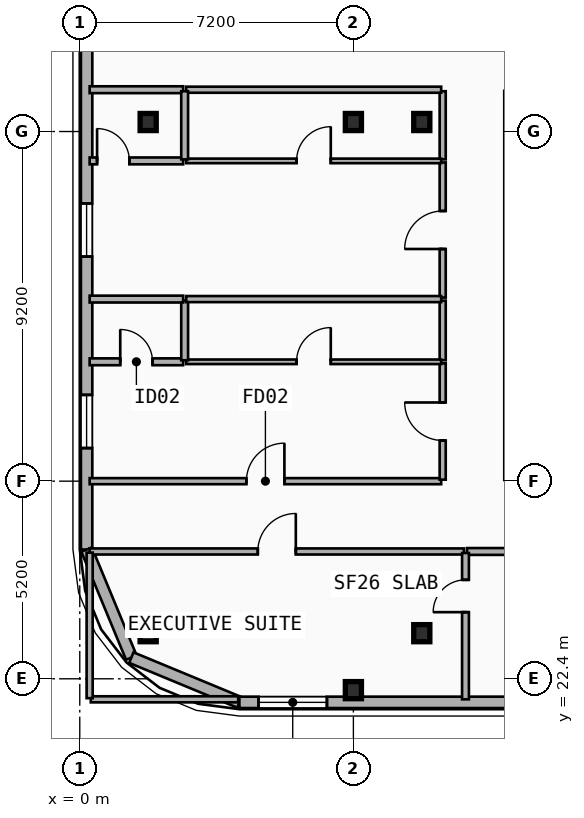
"""IFC4 building model, lengths in metres.
Left out: names, types, materials, properties, quantities, classifications, styles, units other than length and angle.
Written with IfcOpenShell. Run it as: python <this file> out.ifc"""

import sys

from ifc_helpers import new_model, si_unit, direction, frame, frame_2d, origin, origin_2d, place, context, subcontext, project, spatial, rectangle, i_section, extrude, element, fill, save


model = new_model("IFC4")
c1 = context("Model", 3, precision=1e-05, world=origin(), true_north=direction((0.0, 1.0)))
c2 = subcontext(c1, "Body", "Model", "MODEL_VIEW")
j1 = project(units=[si_unit("LENGTHUNIT", "METRE"), si_unit("PLANEANGLEUNIT", "RADIAN")], contexts=[c1])
p1 = place(None, origin())
s1 = spatial("IfcSite", under=j1, at=p1, CompositionType="ELEMENT")
p2 = place(p1, origin())
s2 = spatial("IfcBuilding", under=s1, at=p2, CompositionType="ELEMENT")
p3 = place(p2, frame((0.0, 0.0, 46.5)))
s3 = spatial("IfcBuildingStorey", under=s2, at=p3, CompositionType="ELEMENT", Elevation=46.5)
for number, where, z_axis, x_axis in (
    (1, (9.0, 23.6, 0.0), (0.0, 0.0, 1.0), (1.0, 0.0, 0.0)),
    (2, (9.0, 37.05, 0.0), (0.0, 0.0, 1.0), (1.0, 0.0, 0.0)),
    (3, (1.8, 23.6, 0.0), (0.0, 0.0, 1.0), (1.0, 0.0, 0.0)),
    (4, (1.8, 37.05, 0.0), (0.0, 0.0, 1.0), (1.0, 0.0, 0.0)),
):
    element("IfcColumn", number, at=place(p3, frame(where, z_axis=z_axis, x_axis=x_axis)), inside=s3, PredefinedType="COLUMN", context=c2, shape_type="SweptSolid", body=[
        extrude(i_section(OverallWidth=0.424, OverallDepth=0.45, WebThickness=0.041, FlangeThickness=0.065, FilletRadius=0.015, at=origin_2d()), origin(), (0.0, 0.0, 1.0), 3.5),
    ])
p4 = place(p3, frame((7.2, 22.198, 0.0), z_axis=(0.0, -0.079891690793, 0.996803550226), x_axis=(1.0, 0.0, 0.0)))
e5 = element("IfcColumn", 5, at=p4, inside=s3, PredefinedType="COLUMN", context=c2, shape_type="SweptSolid", body=[
    extrude(i_section(OverallWidth=0.424, OverallDepth=0.45, WebThickness=0.041, FlangeThickness=0.065, FilletRadius=0.015, at=origin_2d()), origin(), (0.0, 0.0, 1.0), 3.511),
])
p5 = place(p3, frame((7.2, 37.05, 0.0), z_axis=(0.0, 0.0, 1.0), x_axis=(1.0, 0.0, 0.0)))
e6 = element("IfcColumn", 6, at=p5, inside=s3, PredefinedType="COLUMN", context=c2, shape_type="SweptSolid", body=[
    extrude(i_section(OverallWidth=0.424, OverallDepth=0.45, WebThickness=0.041, FlangeThickness=0.065, FilletRadius=0.015, at=origin_2d()), origin(), (0.0, 0.0, 1.0), 3.5),
])
p6 = place(p3, frame((0.18, 25.8, 0.0), z_axis=(0.0, 0.0, 1.0), x_axis=(0.0, 1.0, 0.0)))
e7 = element("IfcWall", 7, at=p6, inside=s3, PredefinedType="SOLIDWALL", context=c2, shape_type="SweptSolid", body=[
    extrude(rectangle(XDim=15.2, YDim=0.3, at=frame_2d((7.6, 0.0))), origin(), (0.0, 0.0, 1.0), 3.24),
])
p7 = place(p6, frame((2.67, 0.0, 0.48)))
e8 = element("IfcOpeningElement", 8, at=p7, cuts=e7, PredefinedType="OPENING", context=c2, shape_type="SweptSolid", body=[
    extrude(rectangle(XDim=1.4, YDim=1.8, at=frame_2d((0.7, 0.9))), frame((0.0, 0.16, 0.0), z_axis=(0.0, -1.0, 0.0), x_axis=(1.0, 0.0, 0.0)), (0.0, 0.0, 1.0), 0.32),
])
p8 = place(p6, frame((7.709, 0.0, 0.48)))
e9 = element("IfcOpeningElement", 9, at=p8, cuts=e7, PredefinedType="OPENING", context=c2, shape_type="SweptSolid", body=[
    extrude(rectangle(XDim=1.4, YDim=1.8, at=frame_2d((0.7, 0.9))), frame((0.0, 0.16, 0.0), z_axis=(0.0, -1.0, 0.0), x_axis=(1.0, 0.0, 0.0)), (0.0, 0.0, 1.0), 0.32),
])
for number, where, z_axis, x_axis in (
    (10, (1.357, 22.958, 0.0), (0.0, 0.0, 1.0), (-0.383, 0.924, 0.0)),
    (11, (4.2, 21.78, 0.0), (0.0, 0.0, 1.0), (-0.924, 0.383, 0.0)),
):
    element("IfcWall", number, at=place(p3, frame(where, z_axis=z_axis, x_axis=x_axis)), inside=s3, PredefinedType="SOLIDWALL", context=c2, shape_type="SweptSolid", body=[
        extrude(rectangle(XDim=3.077, YDim=0.3, at=frame_2d((1.538, 0.0))), origin(), (0.0, 0.0, 1.0), 3.24),
    ])
p9 = place(p3, frame((53.4, 21.78, 0.0), z_axis=(0.0, 0.0, 1.0), x_axis=(-1.0, 0.0, 0.0)))
e12 = element("IfcWall", 12, at=p9, inside=s3, PredefinedType="SOLIDWALL", context=c2, shape_type="SweptSolid", body=[
    extrude(rectangle(XDim=49.2, YDim=0.3, at=frame_2d((24.6, 0.0))), origin(), (0.0, 0.0, 1.0), 2.82),
])
p10 = place(p9, frame((46.896, 0.0, 0.65)))
e13 = element("IfcOpeningElement", 13, at=p10, cuts=e12, PredefinedType="OPENING", context=c2, shape_type="SweptSolid", body=[
    extrude(rectangle(XDim=1.8, YDim=1.8, at=frame_2d((0.9, 0.9))), frame((0.0, 0.16, 0.0), z_axis=(0.0, -1.0, 0.0), x_axis=(1.0, 0.0, 0.0)), (0.0, 0.0, 1.0), 0.32),
])
p11 = place(p9, frame((33.295, 0.0, 0.48)))
e14 = element("IfcOpeningElement", 14, at=p11, cuts=e12, PredefinedType="OPENING", context=c2, shape_type="SweptSolid", body=[
    extrude(rectangle(XDim=1.2, YDim=1.5, at=frame_2d((0.6, 0.75))), frame((0.0, 0.16, 0.0), z_axis=(0.0, -1.0, 0.0), x_axis=(1.0, 0.0, 0.0)), (0.0, 0.0, 1.0), 0.32),
])
p12 = place(p9, frame((9.195, 0.0, 0.34)))
e15 = element("IfcOpeningElement", 15, at=p12, cuts=e12, PredefinedType="OPENING", context=c2, shape_type="SweptSolid", body=[
    extrude(rectangle(XDim=1.2, YDim=1.5, at=frame_2d((0.6, 0.75))), frame((0.0, 0.16, 0.0), z_axis=(0.0, -1.0, 0.0), x_axis=(1.0, 0.0, 0.0)), (0.0, 0.0, 1.0), 0.32),
])
p13 = place(p9, frame((4.259, 0.0, 0.65)))
e16 = element("IfcOpeningElement", 16, at=p13, cuts=e12, PredefinedType="OPENING", context=c2, shape_type="SweptSolid", body=[
    extrude(rectangle(XDim=1.8, YDim=1.8, at=frame_2d((0.9, 0.9))), frame((0.0, 0.16, 0.0), z_axis=(0.0, -1.0, 0.0), x_axis=(1.0, 0.0, 0.0)), (0.0, 0.0, 1.0), 0.32),
])
p14 = place(p3, frame((0.26, 27.6, 0.0), z_axis=(0.0, 0.0, 1.0), x_axis=(1.0, 0.0, 0.0)))
e17 = element("IfcWall", 17, at=p14, inside=s3, PredefinedType="PARTITIONING", context=c2, shape_type="SweptSolid", body=[
    extrude(rectangle(XDim=9.25, YDim=0.16, at=frame_2d((4.625, 0.0))), origin(), (0.0, 0.0, 1.0), 2.57),
])
p15 = place(p14, frame((4.125, 0.0, 0.0)))
e18 = element("IfcOpeningElement", 18, at=p15, cuts=e17, PredefinedType="OPENING", context=c2, shape_type="SweptSolid", body=[
    extrude(rectangle(XDim=1.0, YDim=2.15, at=frame_2d((0.5, 1.075))), frame((0.0, 0.09, 0.0), z_axis=(0.0, -1.0, 0.0), x_axis=(1.0, 0.0, 0.0)), (0.0, 0.0, 1.0), 0.18),
])
p16 = place(p3, frame((0.26, 25.75, 0.0), z_axis=(0.0, 0.0, 1.0), x_axis=(1.0, 0.0, 0.0)))
e19 = element("IfcWall", 19, at=p16, inside=s3, PredefinedType="PARTITIONING", context=c2, shape_type="SweptSolid", body=[
    extrude(rectangle(XDim=9.85, YDim=0.16, at=frame_2d((4.925, 0.0))), origin(), (0.0, 0.0, 1.0), 2.57),
])
p17 = place(p16, frame((4.425, 0.0, 0.0)))
e20 = element("IfcOpeningElement", 20, at=p17, cuts=e19, PredefinedType="OPENING", context=c2, shape_type="SweptSolid", body=[
    extrude(rectangle(XDim=1.0, YDim=2.15, at=frame_2d((0.5, 1.075))), frame((0.0, 0.09, 0.0), z_axis=(0.0, -1.0, 0.0), x_axis=(1.0, 0.0, 0.0)), (0.0, 0.0, 1.0), 0.18),
])
p18 = place(p3, frame((10.19, 25.75, 0.0), z_axis=(0.0, 0.0, 1.0), x_axis=(1.0, 0.0, 0.0)))
e21 = element("IfcWall", 21, at=p18, inside=s3, PredefinedType="PLUMBINGWALL", context=c2, shape_type="SweptSolid", body=[
    extrude(rectangle(XDim=1.97, YDim=0.18, at=frame_2d((0.985, 0.0))), origin(), (0.0, 0.0, 1.0), 2.28),
])
p19 = place(p3, frame((9.55, 27.64, 0.0), z_axis=(0.0, 0.0, 1.0), x_axis=(0.0, 1.0, 0.0)))
e22 = element("IfcWall", 22, at=p19, inside=s3, PredefinedType="PARTITIONING", context=c2, shape_type="SweptSolid", body=[
    extrude(rectangle(XDim=3.061, YDim=0.16, at=frame_2d((1.531, 0.0))), origin(), (0.0, 0.0, 1.0), 3.24),
])
p20 = place(p19, frame((1.031, 0.0, 0.0)))
e23 = element("IfcOpeningElement", 23, at=p20, cuts=e22, PredefinedType="OPENING", context=c2, shape_type="SweptSolid", body=[
    extrude(rectangle(XDim=1.0, YDim=2.15, at=frame_2d((0.5, 1.075))), frame((0.0, 0.09, 0.0), z_axis=(0.0, -1.0, 0.0), x_axis=(1.0, 0.0, 0.0)), (0.0, 0.0, 1.0), 0.18),
])
p21 = place(p3, frame((9.55, 30.781, 0.0), z_axis=(0.0, 0.0, 1.0), x_axis=(0.0, 1.0, 0.0)))
e24 = element("IfcWall", 24, at=p21, inside=s3, PredefinedType="PARTITIONING", context=c2, shape_type="SweptSolid", body=[
    extrude(rectangle(XDim=1.57, YDim=0.16, at=frame_2d((0.785, 0.0))), origin(), (0.0, 0.0, 1.0), 3.24),
])
p22 = place(p3, frame((9.55, 32.431, 0.0), z_axis=(0.0, 0.0, 1.0), x_axis=(0.0, 1.0, 0.0)))
e25 = element("IfcWall", 25, at=p22, inside=s3, PredefinedType="PARTITIONING", context=c2, shape_type="SweptSolid", body=[
    extrude(rectangle(XDim=3.556, YDim=0.16, at=frame_2d((1.778, 0.0))), origin(), (0.0, 0.0, 1.0), 3.24),
])
p23 = place(p22, frame((1.278, 0.0, 0.0)))
e26 = element("IfcOpeningElement", 26, at=p23, cuts=e25, PredefinedType="OPENING", context=c2, shape_type="SweptSolid", body=[
    extrude(rectangle(XDim=1.0, YDim=2.15, at=frame_2d((0.5, 1.075))), frame((0.0, 0.09, 0.0), z_axis=(0.0, -1.0, 0.0), x_axis=(1.0, 0.0, 0.0)), (0.0, 0.0, 1.0), 0.18),
])
p24 = place(p3, frame((9.55, 36.067, 0.0), z_axis=(0.0, 0.0, 1.0), x_axis=(0.0, 1.0, 0.0)))
e27 = element("IfcWall", 27, at=p24, inside=s3, PredefinedType="PARTITIONING", context=c2, shape_type="SweptSolid", body=[
    extrude(rectangle(XDim=1.793, YDim=0.16, at=frame_2d((0.896, 0.0))), origin(), (0.0, 0.0, 1.0), 2.72),
])
p25 = place(p3, frame((0.26, 37.9, 0.0), z_axis=(0.0, 0.0, 1.0), x_axis=(1.0, 0.0, 0.0)))
e28 = element("IfcWall", 28, at=p25, inside=s3, PredefinedType="PLUMBINGWALL", context=c2, shape_type="SweptSolid", body=[
    extrude(rectangle(XDim=2.46, YDim=0.18, at=frame_2d((1.23, 0.0))), origin(), (0.0, 0.0, 1.0), 3.24),
])
p26 = place(p3, frame((2.8, 37.9, 0.0), z_axis=(0.0, 0.0, 1.0), x_axis=(1.0, 0.0, 0.0)))
e29 = element("IfcWall", 29, at=p26, inside=s3, PredefinedType="PARTITIONING", context=c2, shape_type="SweptSolid", body=[
    extrude(rectangle(XDim=6.71, YDim=0.16, at=frame_2d((3.355, 0.0))), origin(), (0.0, 0.0, 1.0), 3.24),
])
p27 = place(p3, frame((0.26, 30.741, 0.0), z_axis=(0.0, 0.0, 1.0), x_axis=(1.0, 0.0, 0.0)))
e30 = element("IfcWall", 30, at=p27, inside=s3, PredefinedType="PLUMBINGWALL", context=c2, shape_type="SweptSolid", body=[
    extrude(rectangle(XDim=2.46, YDim=0.18, at=frame_2d((1.23, 0.0))), origin(), (0.0, 0.0, 1.0), 2.57),
])
p28 = place(p27, frame((0.805, 0.0, 0.0)))
e31 = element("IfcOpeningElement", 31, at=p28, cuts=e30, PredefinedType="OPENING", context=c2, shape_type="SweptSolid", body=[
    extrude(rectangle(XDim=0.85, YDim=2.1, at=frame_2d((0.425, 1.05))), frame((0.0, 0.1, 0.0), z_axis=(0.0, -1.0, 0.0), x_axis=(1.0, 0.0, 0.0)), (0.0, 0.0, 1.0), 0.2),
])
p29 = place(p3, frame((2.8, 30.741, 0.0), z_axis=(0.0, 0.0, 1.0), x_axis=(1.0, 0.0, 0.0)))
e32 = element("IfcWall", 32, at=p29, inside=s3, PredefinedType="PARTITIONING", context=c2, shape_type="SweptSolid", body=[
    extrude(rectangle(XDim=6.71, YDim=0.12, at=frame_2d((3.355, 0.0))), origin(), (0.0, 0.0, 1.0), 2.57),
])
p30 = place(p29, frame((2.905, 0.0, 0.0)))
e33 = element("IfcOpeningElement", 33, at=p30, cuts=e32, PredefinedType="OPENING", context=c2, shape_type="SweptSolid", body=[
    extrude(rectangle(XDim=0.9, YDim=2.1, at=frame_2d((0.45, 1.05))), frame((0.0, 0.07, 0.0), z_axis=(0.0, -1.0, 0.0), x_axis=(1.0, 0.0, 0.0)), (0.0, 0.0, 1.0), 0.14),
])
p31 = place(p3, frame((2.76, 30.781, 0.0), z_axis=(0.0, 0.0, 1.0), x_axis=(0.0, 1.0, 0.0)))
e34 = element("IfcWall", 34, at=p31, inside=s3, PredefinedType="PLUMBINGWALL", context=c2, shape_type="SweptSolid", body=[
    extrude(rectangle(XDim=1.57, YDim=0.18, at=frame_2d((0.785, 0.0))), origin(), (0.0, 0.0, 1.0), 3.24),
])
p32 = place(p3, frame((0.26, 32.391, 0.0), z_axis=(0.0, 0.0, 1.0), x_axis=(1.0, 0.0, 0.0)))
e35 = element("IfcWall", 35, at=p32, inside=s3, PredefinedType="PLUMBINGWALL", context=c2, shape_type="SweptSolid", body=[
    extrude(rectangle(XDim=2.46, YDim=0.18, at=frame_2d((1.23, 0.0))), origin(), (0.0, 0.0, 1.0), 2.57),
])
p33 = place(p3, frame((2.8, 32.391, 0.0), z_axis=(0.0, 0.0, 1.0), x_axis=(1.0, 0.0, 0.0)))
e36 = element("IfcWall", 36, at=p33, inside=s3, PredefinedType="PARTITIONING", context=c2, shape_type="SweptSolid", body=[
    extrude(rectangle(XDim=6.71, YDim=0.16, at=frame_2d((3.355, 0.0))), origin(), (0.0, 0.0, 1.0), 2.57),
])
p34 = place(p3, frame((0.26, 36.027, 0.0), z_axis=(0.0, 0.0, 1.0), x_axis=(1.0, 0.0, 0.0)))
e37 = element("IfcWall", 37, at=p34, inside=s3, PredefinedType="PLUMBINGWALL", context=c2, shape_type="SweptSolid", body=[
    extrude(rectangle(XDim=2.46, YDim=0.18, at=frame_2d((1.23, 0.0))), origin(), (0.0, 0.0, 1.0), 2.57),
])
p35 = place(p34, frame((0.195, 0.0, 0.0)))
e38 = element("IfcOpeningElement", 38, at=p35, cuts=e37, PredefinedType="OPENING", context=c2, shape_type="SweptSolid", body=[
    extrude(rectangle(XDim=0.85, YDim=2.1, at=frame_2d((0.425, 1.05))), frame((0.0, 0.1, 0.0), z_axis=(0.0, -1.0, 0.0), x_axis=(1.0, 0.0, 0.0)), (0.0, 0.0, 1.0), 0.2),
])
p36 = place(p3, frame((2.8, 36.027, 0.0), z_axis=(0.0, 0.0, 1.0), x_axis=(1.0, 0.0, 0.0)))
e39 = element("IfcWall", 39, at=p36, inside=s3, PredefinedType="PARTITIONING", context=c2, shape_type="SweptSolid", body=[
    extrude(rectangle(XDim=6.71, YDim=0.12, at=frame_2d((3.355, 0.0))), origin(), (0.0, 0.0, 1.0), 2.57),
])
p37 = place(p36, frame((2.905, 0.0, 0.0)))
e40 = element("IfcOpeningElement", 40, at=p37, cuts=e39, PredefinedType="OPENING", context=c2, shape_type="SweptSolid", body=[
    extrude(rectangle(XDim=0.9, YDim=2.1, at=frame_2d((0.45, 1.05))), frame((0.0, 0.07, 0.0), z_axis=(0.0, -1.0, 0.0), x_axis=(1.0, 0.0, 0.0)), (0.0, 0.0, 1.0), 0.14),
])
p38 = place(p3, frame((2.76, 36.067, 0.0), z_axis=(0.0, 0.0, 1.0), x_axis=(0.0, 1.0, 0.0)))
e41 = element("IfcWall", 41, at=p38, inside=s3, PredefinedType="PLUMBINGWALL", context=c2, shape_type="SweptSolid", body=[
    extrude(rectangle(XDim=1.793, YDim=0.18, at=frame_2d((0.896, 0.0))), origin(), (0.0, 0.0, 1.0), 2.72),
])
p39 = place(p3, frame((10.15, 21.86, 0.0), z_axis=(0.0, 0.0, 1.0), x_axis=(0.0, 1.0, 0.0)))
e42 = element("IfcWall", 42, at=p39, inside=s3, PredefinedType="PLUMBINGWALL", context=c2, shape_type="SweptSolid", body=[
    extrude(rectangle(XDim=3.85, YDim=0.18, at=frame_2d((1.925, 0.0))), origin(), (0.0, 0.0, 1.0), 2.72),
])
p40 = place(p39, frame((2.293, 0.0, 0.0)))
e43 = element("IfcOpeningElement", 43, at=p40, cuts=e42, PredefinedType="OPENING", context=c2, shape_type="SweptSolid", body=[
    extrude(rectangle(XDim=0.85, YDim=2.1, at=frame_2d((0.425, 1.05))), frame((0.0, 0.1, 0.0), z_axis=(0.0, -1.0, 0.0), x_axis=(1.0, 0.0, 0.0)), (0.0, 0.0, 1.0), 0.2),
])
p41 = place(p3, frame((0.29, 21.86, 0.0), z_axis=(0.0, 0.0, 1.0), x_axis=(1.0, 0.0, 0.0)))
e44 = element("IfcWall", 44, at=p41, inside=s3, PredefinedType="PARTITIONING", context=c2, shape_type="SweptSolid", body=[
    extrude(rectangle(XDim=3.88, YDim=0.16, at=frame_2d((1.94, 0.0))), origin(), (0.0, 0.0, 1.0), 2.72),
])
p42 = place(p3, frame((0.26, 21.89, 0.0), z_axis=(0.0, 0.0, 1.0), x_axis=(0.0, 1.0, 0.0)))
e45 = element("IfcWall", 45, at=p42, inside=s3, PredefinedType="PARTITIONING", context=c2, shape_type="SweptSolid", body=[
    extrude(rectangle(XDim=3.83, YDim=0.16, at=frame_2d((1.915, 0.0))), origin(), (0.0, 0.0, 1.0), 3.24),
])
p43 = place(p7, origin())
e46 = element("IfcWindow", 46, at=p43, inside=s3, PartitioningType="SINGLE_PANEL", PredefinedType="WINDOW", context=c2, shape_type="SweptSolid", body=[
    extrude(rectangle(XDim=1.4, YDim=1.8, at=frame_2d((0.7, 0.9))), frame((0.0, 0.03, 0.0), z_axis=(0.0, -1.0, 0.0), x_axis=(1.0, 0.0, 0.0)), (0.0, 0.0, 1.0), 0.06),
])
fill(e8, e46)
p44 = place(p8, origin())
e47 = element("IfcWindow", 47, at=p44, inside=s3, PartitioningType="SINGLE_PANEL", PredefinedType="WINDOW", context=c2, shape_type="SweptSolid", body=[
    extrude(rectangle(XDim=1.4, YDim=1.8, at=frame_2d((0.7, 0.9))), frame((0.0, 0.03, 0.0), z_axis=(0.0, -1.0, 0.0), x_axis=(1.0, 0.0, 0.0)), (0.0, 0.0, 1.0), 0.06),
])
fill(e9, e47)
p45 = place(p10, origin())
e48 = element("IfcWindow", 48, at=p45, inside=s3, PartitioningType="SINGLE_PANEL", PredefinedType="WINDOW", context=c2, shape_type="SweptSolid", body=[
    extrude(rectangle(XDim=1.8, YDim=1.8, at=frame_2d((0.9, 0.9))), frame((0.0, 0.03, 0.0), z_axis=(0.0, -1.0, 0.0), x_axis=(1.0, 0.0, 0.0)), (0.0, 0.0, 1.0), 0.06),
])
fill(e13, e48)
p46 = place(p15, origin())
e49 = element("IfcDoor", 49, at=p46, inside=s3, OperationType="SINGLE_SWING_RIGHT", PredefinedType="DOOR", context=c2, shape_type="SweptSolid", body=[
    extrude(rectangle(XDim=1.0, YDim=2.15, at=frame_2d((0.5, 1.075))), frame((0.0, 0.025, 0.0), z_axis=(0.0, -1.0, 0.0), x_axis=(1.0, 0.0, 0.0)), (0.0, 0.0, 1.0), 0.05),
])
fill(e18, e49)
p47 = place(p17, origin())
e50 = element("IfcDoor", 50, at=p47, inside=s3, OperationType="SINGLE_SWING_RIGHT", PredefinedType="DOOR", context=c2, shape_type="SweptSolid", body=[
    extrude(rectangle(XDim=1.0, YDim=2.15, at=frame_2d((0.5, 1.075))), frame((0.0, 0.025, 0.0), z_axis=(0.0, -1.0, 0.0), x_axis=(1.0, 0.0, 0.0)), (0.0, 0.0, 1.0), 0.05),
])
fill(e20, e50)
p48 = place(p20, origin())
e51 = element("IfcDoor", 51, at=p48, inside=s3, OperationType="SINGLE_SWING_RIGHT", PredefinedType="DOOR", context=c2, shape_type="SweptSolid", body=[
    extrude(rectangle(XDim=1.0, YDim=2.15, at=frame_2d((0.5, 1.075))), frame((0.0, 0.025, 0.0), z_axis=(0.0, -1.0, 0.0), x_axis=(1.0, 0.0, 0.0)), (0.0, 0.0, 1.0), 0.05),
])
fill(e23, e51)
p49 = place(p23, origin())
e52 = element("IfcDoor", 52, at=p49, inside=s3, OperationType="SINGLE_SWING_LEFT", PredefinedType="DOOR", context=c2, shape_type="SweptSolid", body=[
    extrude(rectangle(XDim=1.0, YDim=2.15, at=frame_2d((0.5, 1.075))), frame((0.0, 0.025, 0.0), z_axis=(0.0, -1.0, 0.0), x_axis=(1.0, 0.0, 0.0)), (0.0, 0.0, 1.0), 0.05),
])
fill(e26, e52)
p50 = place(p28, origin())
e53 = element("IfcDoor", 53, at=p50, inside=s3, OperationType="SINGLE_SWING_LEFT", PredefinedType="DOOR", context=c2, shape_type="SweptSolid", body=[
    extrude(rectangle(XDim=0.85, YDim=2.1, at=frame_2d((0.425, 1.05))), frame((0.0, 0.025, 0.0), z_axis=(0.0, -1.0, 0.0), x_axis=(1.0, 0.0, 0.0)), (0.0, 0.0, 1.0), 0.05),
])
fill(e31, e53)
p51 = place(p30, origin())
e54 = element("IfcDoor", 54, at=p51, inside=s3, OperationType="SINGLE_SWING_RIGHT", PredefinedType="DOOR", context=c2, shape_type="SweptSolid", body=[
    extrude(rectangle(XDim=0.9, YDim=2.1, at=frame_2d((0.45, 1.05))), frame((0.0, 0.025, 0.0), z_axis=(0.0, -1.0, 0.0), x_axis=(1.0, 0.0, 0.0)), (0.0, 0.0, 1.0), 0.05),
])
fill(e33, e54)
p52 = place(p35, origin())
e55 = element("IfcDoor", 55, at=p52, inside=s3, OperationType="SINGLE_SWING_LEFT", PredefinedType="DOOR", context=c2, shape_type="SweptSolid", body=[
    extrude(rectangle(XDim=0.85, YDim=2.1, at=frame_2d((0.425, 1.05))), frame((0.0, 0.025, 0.0), z_axis=(0.0, -1.0, 0.0), x_axis=(1.0, 0.0, 0.0)), (0.0, 0.0, 1.0), 0.05),
])
fill(e38, e55)
p53 = place(p37, origin())
e56 = element("IfcDoor", 56, at=p53, inside=s3, OperationType="SINGLE_SWING_RIGHT", PredefinedType="DOOR", context=c2, shape_type="SweptSolid", body=[
    extrude(rectangle(XDim=0.9, YDim=2.1, at=frame_2d((0.45, 1.05))), frame((0.0, 0.025, 0.0), z_axis=(0.0, -1.0, 0.0), x_axis=(1.0, 0.0, 0.0)), (0.0, 0.0, 1.0), 0.05),
])
fill(e40, e56)
p54 = place(p40, origin())
e57 = element("IfcDoor", 57, at=p54, inside=s3, OperationType="SINGLE_SWING_LEFT", PredefinedType="DOOR", context=c2, shape_type="SweptSolid", body=[
    extrude(rectangle(XDim=0.85, YDim=2.1, at=frame_2d((0.425, 1.05))), frame((0.0, 0.025, 0.0), z_axis=(0.0, -1.0, 0.0), x_axis=(1.0, 0.0, 0.0)), (0.0, 0.0, 1.0), 0.05),
])
fill(e43, e57)
save(model, sys.argv[1])
